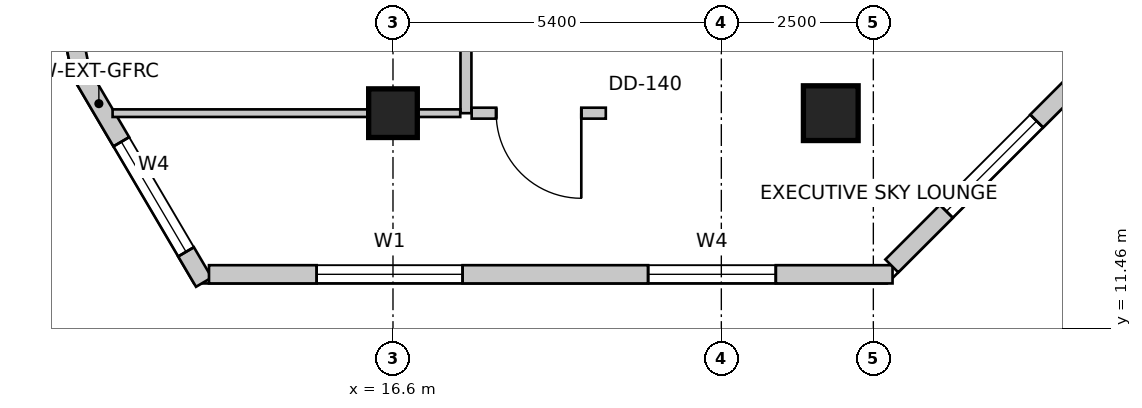
"""IFC4 building model, lengths in metres.
Left out: names, types, materials, properties, quantities, classifications, styles, units other than length and angle.
Written with IfcOpenShell. Run it as: python <this file> out.ifc"""

import sys

from ifc_helpers import new_model, si_unit, direction, frame, frame_2d, origin, origin_2d, place, context, subcontext, project, spatial, rectangle, extrude, source, transform, mapped, element, fill, save


model = new_model("IFC4")
c1 = context("Model", 3, precision=1e-05, world=origin(), true_north=direction((0.0, 1.0)))
c2 = subcontext(c1, "Body", "Model", "MODEL_VIEW")
j1 = project(units=[si_unit("LENGTHUNIT", "METRE"), si_unit("PLANEANGLEUNIT", "RADIAN")], contexts=[c1])
p1 = place(None, origin())
s1 = spatial("IfcSite", under=j1, at=p1, CompositionType="ELEMENT")
p2 = place(p1, origin())
s2 = spatial("IfcBuilding", under=s1, at=p2, CompositionType="ELEMENT")
p3 = place(p2, frame((0.0, 0.0, 139.4)))
s3 = spatial("IfcBuildingStorey", under=s2, at=p3, CompositionType="ELEMENT", Elevation=139.4)
m1 = source(origin(), c2, "Body", "SweptSolid", [
    extrude(rectangle(XDim=0.9, YDim=0.9, at=origin_2d()), origin(), (0.0, 0.0, 1.0), 3.6),
])
p4 = place(p3, frame((23.8, 15.0, 0.0), z_axis=(0.0, 0.0, 1.0), x_axis=(1.0, 0.0, 0.0)))
e1 = element("IfcColumn", 1, at=p4, inside=s3, PredefinedType="COLUMN", context=c2, shape_type="MappedRepresentation", body=[
    mapped(m1, transform((0.0, 0.0, 0.0), scale=1.0)),
])
m2 = source(origin(), c2, "Body", "SweptSolid", [
    extrude(rectangle(XDim=0.8, YDim=0.8, at=origin_2d()), origin(), (0.0, 0.0, 1.0), 3.6),
])
p5 = place(p3, frame((16.6, 15.0, 0.0), z_axis=(0.0, 0.0, 1.0), x_axis=(1.0, 0.0, 0.0)))
e2 = element("IfcColumn", 2, at=p5, inside=s3, PredefinedType="COLUMN", context=c2, shape_type="MappedRepresentation", body=[
    mapped(m2, transform((0.0, 0.0, 0.0), scale=1.0)),
])
p6 = place(p3, frame((11.394, 15.784, 0.0), z_axis=(0.0, 0.0, 1.0), x_axis=(0.50698915279, -0.861952434275, 0.0)))
e3 = element("IfcWall", 3, at=p6, inside=s3, PredefinedType="SOLIDWALL", context=c2, shape_type="SweptSolid", body=[
    extrude(rectangle(XDim=4.134, YDim=0.3, at=frame_2d((2.067, 0.0))), origin(), (0.0, 0.0, 1.0), 3.35),
])
m3 = source(origin(), c2, "Body", "SweptSolid", [
    extrude(rectangle(XDim=2.1, YDim=2.0, at=frame_2d((1.05, 1.0))), frame((0.0, 0.16, 0.0), z_axis=(0.0, -1.0, 0.0), x_axis=(1.0, 0.0, 0.0)), (0.0, 0.0, 1.0), 0.32),
])
p7 = place(p6, frame((1.455, 0.0, 0.85)))
e4 = element("IfcOpeningElement", 4, at=p7, cuts=e3, PredefinedType="OPENING", context=c2, shape_type="MappedRepresentation", body=[
    mapped(m3, transform((0.0, 0.0, 0.0), scale=1.0)),
])
p8 = place(p3, frame((13.574, 12.35, 0.0), z_axis=(0.0, 0.0, 1.0), x_axis=(1.0, 0.0, 0.0)))
e5 = element("IfcWall", 5, at=p8, inside=s3, PredefinedType="SOLIDWALL", context=c2, shape_type="SweptSolid", body=[
    extrude(rectangle(XDim=11.242, YDim=0.3, at=frame_2d((5.621, 0.0))), origin(), (0.0, 0.0, 1.0), 3.35),
])
m4 = source(origin(), c2, "Body", "SweptSolid", [
    extrude(rectangle(XDim=2.4, YDim=2.2, at=frame_2d((1.2, 1.1))), frame((0.0, 0.16, 0.0), z_axis=(0.0, -1.0, 0.0), x_axis=(1.0, 0.0, 0.0)), (0.0, 0.0, 1.0), 0.32),
])
p9 = place(p8, frame((1.771, 0.0, 0.85)))
e6 = element("IfcOpeningElement", 6, at=p9, cuts=e5, PredefinedType="OPENING", context=c2, shape_type="MappedRepresentation", body=[
    mapped(m4, transform((0.0, 0.0, 0.0), scale=1.0)),
])
p10 = place(p8, frame((7.222, 0.0, 0.85)))
e7 = element("IfcOpeningElement", 7, at=p10, cuts=e5, PredefinedType="OPENING", context=c2, shape_type="MappedRepresentation", body=[
    mapped(m3, transform((0.0, 0.0, 0.0), scale=1.0)),
])
p11 = place(p3, frame((24.804, 12.488, 0.0), z_axis=(0.0, 0.0, 1.0), x_axis=(0.70708046583, 0.707133095564, 0.0)))
e8 = element("IfcWall", 8, at=p11, inside=s3, PredefinedType="SOLIDWALL", context=c2, shape_type="SweptSolid", body=[
    extrude(rectangle(XDim=4.639, YDim=0.3, at=frame_2d((2.319, 0.0))), origin(), (0.0, 0.0, 1.0), 3.35),
])
p12 = place(p11, frame((1.269, 0.0, 0.85)))
e9 = element("IfcOpeningElement", 9, at=p12, cuts=e8, PredefinedType="OPENING", context=c2, shape_type="MappedRepresentation", body=[
    mapped(m3, transform((0.0, 0.0, 0.0), scale=1.0)),
])
p13 = place(p3, frame((8.187, 31.834, 0.0), z_axis=(0.0, 0.0, 1.0), x_axis=(0.198869838988, -0.980025911464, 0.0)))
e10 = element("IfcWall", 10, at=p13, inside=s3, PredefinedType="SOLIDWALL", context=c2, shape_type="SweptSolid", body=[
    extrude(rectangle(XDim=16.363, YDim=0.3, at=frame_2d((8.182, 0.0))), origin(), (0.0, 0.0, 1.0), 3.35),
])
m5 = source(origin(), c2, "Body", "SweptSolid", [
    extrude(rectangle(XDim=1.2, YDim=1.6, at=frame_2d((0.6, 0.8))), frame((0.0, 0.16, 0.0), z_axis=(0.0, -1.0, 0.0), x_axis=(1.0, 0.0, 0.0)), (0.0, 0.0, 1.0), 0.32),
])
p14 = place(p13, frame((1.131, 0.0, 0.85)))
e11 = element("IfcOpeningElement", 11, at=p14, cuts=e10, PredefinedType="OPENING", context=c2, shape_type="MappedRepresentation", body=[
    mapped(m5, transform((0.0, 0.0, 0.0), scale=1.0)),
])
p15 = place(p13, frame((4.38, 0.0, 0.85)))
e12 = element("IfcOpeningElement", 12, at=p15, cuts=e10, PredefinedType="OPENING", context=c2, shape_type="MappedRepresentation", body=[
    mapped(m3, transform((0.0, 0.0, 0.0), scale=1.0)),
])
p16 = place(p13, frame((8.539, 0.0, 0.85)))
e13 = element("IfcOpeningElement", 13, at=p16, cuts=e10, PredefinedType="OPENING", context=c2, shape_type="MappedRepresentation", body=[
    mapped(m5, transform((0.0, 0.0, 0.0), scale=1.0)),
])
p17 = place(p13, frame((12.212, 0.0, 0.85)))
e14 = element("IfcOpeningElement", 14, at=p17, cuts=e10, PredefinedType="OPENING", context=c2, shape_type="MappedRepresentation", body=[
    mapped(m3, transform((0.0, 0.0, 0.0), scale=1.0)),
])
p18 = place(p3, frame((17.8, 15.0, 0.0), z_axis=(0.0, 0.0, 1.0), x_axis=(0.0, 1.0, 0.0)))
e15 = element("IfcWall", 15, at=p18, inside=s3, PredefinedType="PARTITIONING", context=c2, shape_type="SweptSolid", body=[
    extrude(rectangle(XDim=8.838, YDim=0.18, at=frame_2d((4.419, 0.0))), origin(), (0.0, 0.0, 1.0), 2.492),
])
m6 = source(origin(), c2, "Body", "SweptSolid", [
    extrude(rectangle(XDim=0.9, YDim=2.15, at=frame_2d((0.45, 1.075))), frame((0.0, 0.1, 0.0), z_axis=(0.0, -1.0, 0.0), x_axis=(1.0, 0.0, 0.0)), (0.0, 0.0, 1.0), 0.2),
])
p19 = place(p18, frame((3.908, 0.0, 0.0)))
e16 = element("IfcOpeningElement", 16, at=p19, cuts=e15, PredefinedType="OPENING", context=c2, shape_type="MappedRepresentation", body=[
    mapped(m6, transform((0.0, 0.0, 0.0), scale=1.0)),
])
p20 = place(p3, frame((20.1, 15.0, 0.0), z_axis=(0.0, 0.0, 1.0), x_axis=(-1.0, 0.0, 0.0)))
e17 = element("IfcWall", 17, at=p20, inside=s3, PredefinedType="PARTITIONING", context=c2, shape_type="SweptSolid", body=[
    extrude(rectangle(XDim=2.206, YDim=0.18, at=frame_2d((1.103, 0.0))), origin(), (0.0, 0.0, 1.0), 2.492),
])
m7 = source(origin(), c2, "Body", "SweptSolid", [
    extrude(rectangle(XDim=1.4, YDim=2.15, at=frame_2d((0.7, 1.075))), frame((0.0, 0.1, 0.0), z_axis=(0.0, -1.0, 0.0), x_axis=(1.0, 0.0, 0.0)), (0.0, 0.0, 1.0), 0.2),
])
p21 = place(p20, frame((0.403, 0.0, 0.0)))
e18 = element("IfcOpeningElement", 18, at=p21, cuts=e17, PredefinedType="OPENING", context=c2, shape_type="MappedRepresentation", body=[
    mapped(m7, transform((0.0, 0.0, 0.0), scale=1.0)),
])
p22 = place(p3, frame((17.706, 15.0, 0.0), z_axis=(0.0, 0.0, 1.0), x_axis=(-1.0, 0.0, 0.0)))
e19 = element("IfcWall", 19, at=p22, inside=s3, PredefinedType="PARTITIONING", context=c2, shape_type="SweptSolid", body=[
    extrude(rectangle(XDim=5.718, YDim=0.125, at=frame_2d((2.859, 0.0))), origin(), (0.0, 0.0, 1.0), 2.492),
])
m8 = source(origin(), c2, "Body", "SweptSolid", [
    extrude(rectangle(XDim=2.1, YDim=2.0, at=frame_2d((1.05, 1.0))), frame((0.0, -0.015, 0.0), z_axis=(0.0, -1.0, 0.0), x_axis=(1.0, 0.0, 0.0)), (0.0, 0.0, 1.0), 0.06),
])
p23 = place(p7, origin())
e20 = element("IfcWindow", 20, at=p23, inside=s3, PartitioningType="SINGLE_PANEL", PredefinedType="WINDOW", context=c2, shape_type="MappedRepresentation", body=[
    mapped(m8, transform((0.0, 0.0, 0.0), scale=1.0)),
])
fill(e4, e20)
m9 = source(origin(), c2, "Body", "SweptSolid", [
    extrude(rectangle(XDim=2.4, YDim=2.2, at=frame_2d((1.2, 1.1))), frame((0.0, -0.015, 0.0), z_axis=(0.0, -1.0, 0.0), x_axis=(1.0, 0.0, 0.0)), (0.0, 0.0, 1.0), 0.06),
])
p24 = place(p9, origin())
e21 = element("IfcWindow", 21, at=p24, inside=s3, PartitioningType="SINGLE_PANEL", PredefinedType="WINDOW", context=c2, shape_type="MappedRepresentation", body=[
    mapped(m9, transform((0.0, 0.0, 0.0), scale=1.0)),
])
fill(e6, e21)
p25 = place(p10, origin())
e22 = element("IfcWindow", 22, at=p25, inside=s3, PartitioningType="SINGLE_PANEL", PredefinedType="WINDOW", context=c2, shape_type="MappedRepresentation", body=[
    mapped(m8, transform((0.0, 0.0, 0.0), scale=1.0)),
])
fill(e7, e22)
p26 = place(p12, origin())
e23 = element("IfcWindow", 23, at=p26, inside=s3, PartitioningType="SINGLE_PANEL", PredefinedType="WINDOW", context=c2, shape_type="MappedRepresentation", body=[
    mapped(m8, transform((0.0, 0.0, 0.0), scale=1.0)),
])
fill(e9, e23)
m10 = source(origin(), c2, "Body", "SweptSolid", [
    extrude(rectangle(XDim=1.4, YDim=2.15, at=frame_2d((0.7, 1.075))), frame((0.0, 0.025, 0.0), z_axis=(0.0, -1.0, 0.0), x_axis=(1.0, 0.0, 0.0)), (0.0, 0.0, 1.0), 0.05),
])
p27 = place(p21, origin())
e24 = element("IfcDoor", 24, at=p27, inside=s3, OperationType="SINGLE_SWING_LEFT", PredefinedType="DOOR", context=c2, shape_type="MappedRepresentation", body=[
    mapped(m10, transform((0.0, 0.0, 0.0), scale=1.0)),
])
fill(e18, e24)
save(model, sys.argv[1])
